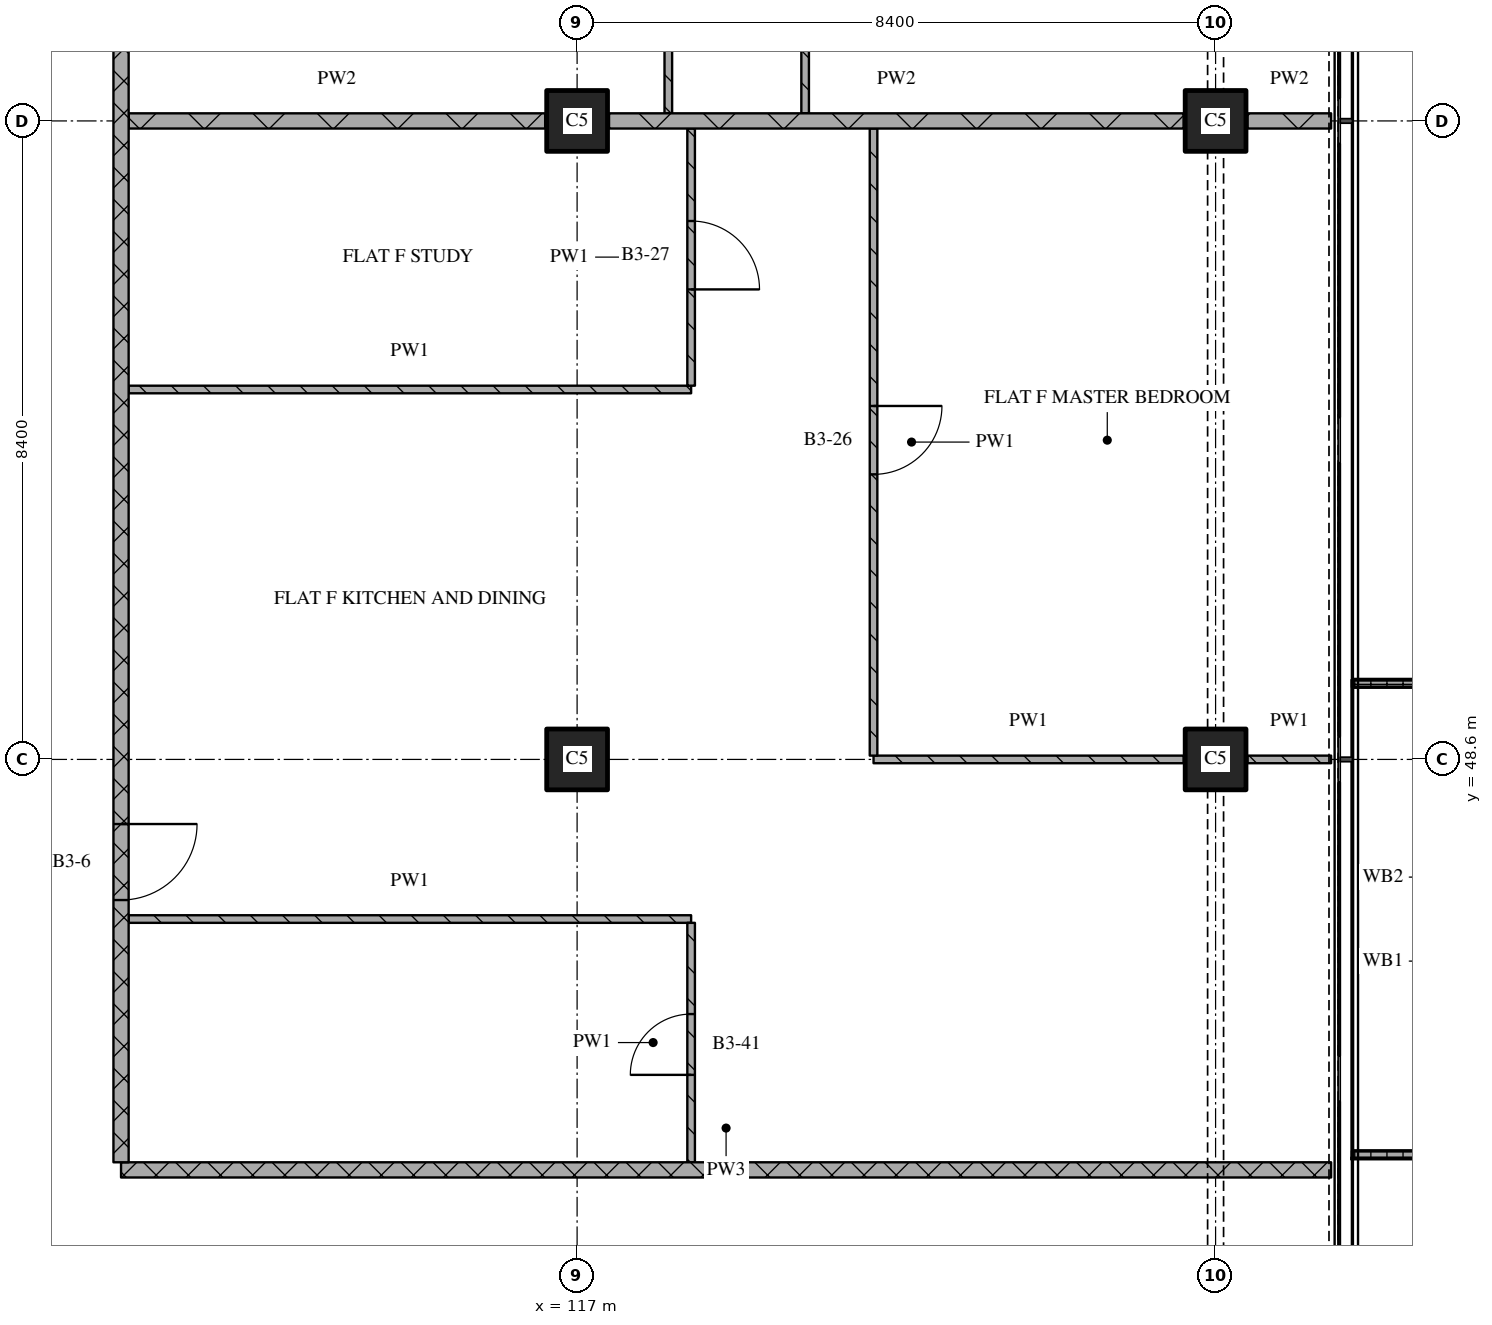
"""IFC4 building model, lengths in metres.
Left out: names, types, materials, properties, quantities, classifications, styles, units other than length and angle.
Written with IfcOpenShell. Run it as: python <this file> out.ifc"""

import sys

from ifc_helpers import new_model, si_unit, direction, frame, frame_2d, origin, origin_2d, place, context, subcontext, project, spatial, polyline, rectangle, outline, extrude, element, fill, save


model = new_model("IFC4")
c1 = context("Model", 3, precision=1e-05, world=origin(), true_north=direction((0.0, 1.0)))
c2 = subcontext(c1, "Body", "Model", "MODEL_VIEW")
j1 = project(units=[si_unit("LENGTHUNIT", "METRE"), si_unit("PLANEANGLEUNIT", "RADIAN")], contexts=[c1])
p1 = place(None, origin())
s1 = spatial("IfcSite", under=j1, at=p1, CompositionType="ELEMENT")
p2 = place(p1, origin())
s2 = spatial("IfcBuilding", under=s1, at=p2, CompositionType="ELEMENT")
p3 = place(p2, frame((0.0, 0.0, 124.05)))
s3 = spatial("IfcBuildingStorey", under=s2, at=p3, CompositionType="ELEMENT", Elevation=124.05)
for number, where, z_axis, x_axis in (
    (1, (117.0, 48.6, 0.0), (0.0, 0.0, 1.0), (1.0, 0.0, 0.0)),
    (2, (117.0, 57.0, 0.0), (0.0, 0.0, 1.0), (1.0, 0.0, 0.0)),
    (3, (125.4, 48.6, 0.0), (0.0, 0.0, 1.0), (1.0, 0.0, 0.0)),
    (4, (125.4, 57.0, 0.0), (0.0, 0.0, 1.0), (1.0, 0.0, 0.0)),
):
    element("IfcColumn", number, at=place(p3, frame(where, z_axis=z_axis, x_axis=x_axis)), inside=s3, PredefinedType="COLUMN", context=c2, shape_type="SweptSolid", body=[
        extrude(rectangle(XDim=0.8, YDim=0.8, at=origin_2d()), origin(), (0.0, 0.0, 1.0), 3.6),
    ])
p4 = place(p3, origin())
e5 = element("IfcWall", 5, at=p4, inside=s3, PredefinedType="SOLIDWALL", context=c2, shape_type="SweptSolid", body=[
    extrude(outline(polyline([(127.2, 43.35), (127.2, 43.45), (128.967, 43.45), (128.967, 49.55), (127.2, 49.55), (127.2, 49.65), (129.067, 49.65), (129.067, 43.35), (127.2, 43.35)])), origin(), (0.0, 0.0, 1.0), 1.0),
])
p5 = place(p3, frame((111.0, 43.2, 0.0), z_axis=(0.0, 0.0, 1.0), x_axis=(1.0, 0.0, 0.0)))
e6 = element("IfcWall", 6, at=p5, inside=s3, PredefinedType="PARTITIONING", context=c2, shape_type="SweptSolid", body=[
    extrude(rectangle(XDim=15.92, YDim=0.2, at=frame_2d((7.96, 0.0))), origin(), (0.0, 0.0, 1.0), 3.32),
])
p6 = place(p3, frame((111.1, 46.5, 0.0), z_axis=(0.0, 0.0, 1.0), x_axis=(1.0, 0.0, 0.0)))
e7 = element("IfcWall", 7, at=p6, inside=s3, PredefinedType="PARTITIONING", context=c2, shape_type="SweptSolid", body=[
    extrude(rectangle(XDim=7.4, YDim=0.1, at=frame_2d((3.7, 0.0))), origin(), (0.0, 0.0, 1.0), 3.32),
])
p7 = place(p3, frame((120.9, 48.6, 0.0), z_axis=(0.0, 0.0, 1.0), x_axis=(1.0, 0.0, 0.0)))
e8 = element("IfcWall", 8, at=p7, inside=s3, PredefinedType="PARTITIONING", context=c2, shape_type="SweptSolid", body=[
    extrude(rectangle(XDim=4.08, YDim=0.1, at=frame_2d((2.04, 0.0))), origin(), (0.0, 0.0, 1.0), 3.32),
])
p8 = place(p3, frame((125.82, 48.6, 0.0), z_axis=(0.0, 0.0, 1.0), x_axis=(1.0, 0.0, 0.0)))
e9 = element("IfcWall", 9, at=p8, inside=s3, PredefinedType="PARTITIONING", context=c2, shape_type="SweptSolid", body=[
    extrude(rectangle(XDim=1.1, YDim=0.1, at=frame_2d((0.55, 0.0))), origin(), (0.0, 0.0, 1.0), 3.32),
])
p9 = place(p3, frame((111.1, 53.467, 0.0), z_axis=(0.0, 0.0, 1.0), x_axis=(1.0, 0.0, 0.0)))
e10 = element("IfcWall", 10, at=p9, inside=s3, PredefinedType="PARTITIONING", context=c2, shape_type="SweptSolid", body=[
    extrude(rectangle(XDim=7.4, YDim=0.1, at=frame_2d((3.7, 0.0))), origin(), (0.0, 0.0, 1.0), 3.32),
])
p10 = place(p3, frame((111.1, 57.0, 0.0), z_axis=(0.0, 0.0, 1.0), x_axis=(1.0, 0.0, 0.0)))
e11 = element("IfcWall", 11, at=p10, inside=s3, PredefinedType="PARTITIONING", context=c2, shape_type="SweptSolid", body=[
    extrude(rectangle(XDim=5.48, YDim=0.2, at=frame_2d((2.74, 0.0))), origin(), (0.0, 0.0, 1.0), 3.32),
])
p11 = place(p3, frame((117.42, 57.0, 0.0), z_axis=(0.0, 0.0, 1.0), x_axis=(1.0, 0.0, 0.0)))
e12 = element("IfcWall", 12, at=p11, inside=s3, PredefinedType="PARTITIONING", context=c2, shape_type="SweptSolid", body=[
    extrude(rectangle(XDim=7.56, YDim=0.2, at=frame_2d((3.78, 0.0))), origin(), (0.0, 0.0, 1.0), 3.32),
])
p12 = place(p3, frame((125.82, 57.0, 0.0), z_axis=(0.0, 0.0, 1.0), x_axis=(1.0, 0.0, 0.0)))
e13 = element("IfcWall", 13, at=p12, inside=s3, PredefinedType="PARTITIONING", context=c2, shape_type="SweptSolid", body=[
    extrude(rectangle(XDim=1.1, YDim=0.2, at=frame_2d((0.55, 0.0))), origin(), (0.0, 0.0, 1.0), 3.32),
])
p13 = place(p3, frame((111.0, 75.32, 0.0), z_axis=(0.0, 0.0, 1.0), x_axis=(0.0, -1.0, 0.0)))
e14 = element("IfcWall", 14, at=p13, inside=s3, PredefinedType="PARTITIONING", context=c2, shape_type="SweptSolid", body=[
    extrude(rectangle(XDim=32.02, YDim=0.2, at=frame_2d((16.01, 0.0))), origin(), (0.0, 0.0, 1.0), 3.32),
])
p14 = place(p13, frame((11.37, 0.0, 0.0)))
e15 = element("IfcOpeningElement", 15, at=p14, cuts=e14, PredefinedType="OPENING", context=c2, shape_type="SweptSolid", body=[
    extrude(rectangle(XDim=1.0, YDim=2.1, at=frame_2d((0.5, 1.05))), frame((0.0, 0.11, 0.0), z_axis=(0.0, -1.0, 0.0), x_axis=(1.0, 0.0, 0.0)), (0.0, 0.0, 1.0), 0.22),
])
p15 = place(p13, frame((27.57, 0.0, 0.0)))
e16 = element("IfcOpeningElement", 16, at=p15, cuts=e14, PredefinedType="OPENING", context=c2, shape_type="SweptSolid", body=[
    extrude(rectangle(XDim=1.0, YDim=2.1, at=frame_2d((0.5, 1.05))), frame((0.0, 0.11, 0.0), z_axis=(0.0, -1.0, 0.0), x_axis=(1.0, 0.0, 0.0)), (0.0, 0.0, 1.0), 0.22),
])
p16 = place(p3, frame((118.2, 57.1, 0.0), z_axis=(0.0, 0.0, 1.0), x_axis=(0.0, 1.0, 0.0)))
e17 = element("IfcWall", 17, at=p16, inside=s3, PredefinedType="PARTITIONING", context=c2, shape_type="SweptSolid", body=[
    extrude(rectangle(XDim=5.55, YDim=0.1, at=frame_2d((2.775, 0.0))), origin(), (0.0, 0.0, 1.0), 3.32),
])
p17 = place(p16, frame((1.3, 0.0, 0.0)))
e18 = element("IfcOpeningElement", 18, at=p17, cuts=e17, PredefinedType="OPENING", context=c2, shape_type="SweptSolid", body=[
    extrude(rectangle(XDim=0.8, YDim=2.1, at=frame_2d((0.4, 1.05))), frame((0.0, 0.06, 0.0), z_axis=(0.0, -1.0, 0.0), x_axis=(1.0, 0.0, 0.0)), (0.0, 0.0, 1.0), 0.12),
])
p18 = place(p16, frame((4.15, 0.0, 0.0)))
e19 = element("IfcOpeningElement", 19, at=p18, cuts=e17, PredefinedType="OPENING", context=c2, shape_type="SweptSolid", body=[
    extrude(rectangle(XDim=0.8, YDim=2.1, at=frame_2d((0.4, 1.05))), frame((0.0, 0.06, 0.0), z_axis=(0.0, -1.0, 0.0), x_axis=(1.0, 0.0, 0.0)), (0.0, 0.0, 1.0), 0.12),
])
p19 = place(p3, frame((118.5, 43.3, 0.0), z_axis=(0.0, 0.0, 1.0), x_axis=(0.0, 1.0, 0.0)))
e20 = element("IfcWall", 20, at=p19, inside=s3, PredefinedType="PARTITIONING", context=c2, shape_type="SweptSolid", body=[
    extrude(rectangle(XDim=3.15, YDim=0.1, at=frame_2d((1.575, 0.0))), origin(), (0.0, 0.0, 1.0), 3.32),
])
p20 = place(p19, frame((1.15, 0.0, 0.0)))
e21 = element("IfcOpeningElement", 21, at=p20, cuts=e20, PredefinedType="OPENING", context=c2, shape_type="SweptSolid", body=[
    extrude(rectangle(XDim=0.8, YDim=2.1, at=frame_2d((0.4, 1.05))), frame((0.0, 0.06, 0.0), z_axis=(0.0, -1.0, 0.0), x_axis=(1.0, 0.0, 0.0)), (0.0, 0.0, 1.0), 0.12),
])
p21 = place(p3, frame((118.5, 53.517, 0.0), z_axis=(0.0, 0.0, 1.0), x_axis=(0.0, 1.0, 0.0)))
e22 = element("IfcWall", 22, at=p21, inside=s3, PredefinedType="PARTITIONING", context=c2, shape_type="SweptSolid", body=[
    extrude(rectangle(XDim=3.383, YDim=0.1, at=frame_2d((1.692, 0.0))), origin(), (0.0, 0.0, 1.0), 3.32),
])
p22 = place(p21, frame((1.267, 0.0, 0.0)))
e23 = element("IfcOpeningElement", 23, at=p22, cuts=e22, PredefinedType="OPENING", context=c2, shape_type="SweptSolid", body=[
    extrude(rectangle(XDim=0.9, YDim=2.1, at=frame_2d((0.45, 1.05))), frame((0.0, 0.06, 0.0), z_axis=(0.0, -1.0, 0.0), x_axis=(1.0, 0.0, 0.0)), (0.0, 0.0, 1.0), 0.12),
])
p23 = place(p3, frame((120.0, 65.35, 0.0), z_axis=(0.0, 0.0, 1.0), x_axis=(0.0, -1.0, 0.0)))
e24 = element("IfcWall", 24, at=p23, inside=s3, PredefinedType="PARTITIONING", context=c2, shape_type="SweptSolid", body=[
    extrude(rectangle(XDim=8.25, YDim=0.1, at=frame_2d((4.125, 0.0))), origin(), (0.0, 0.0, 1.0), 3.32),
])
p24 = place(p3, frame((120.9, 56.9, 0.0), z_axis=(0.0, 0.0, 1.0), x_axis=(0.0, -1.0, 0.0)))
e25 = element("IfcWall", 25, at=p24, inside=s3, PredefinedType="PARTITIONING", context=c2, shape_type="SweptSolid", body=[
    extrude(rectangle(XDim=8.25, YDim=0.1, at=frame_2d((4.125, 0.0))), origin(), (0.0, 0.0, 1.0), 3.32),
])
p25 = place(p24, frame((3.65, 0.0, 0.0)))
e26 = element("IfcOpeningElement", 26, at=p25, cuts=e25, PredefinedType="OPENING", context=c2, shape_type="SweptSolid", body=[
    extrude(rectangle(XDim=0.9, YDim=2.1, at=frame_2d((0.45, 1.05))), frame((0.0, 0.06, 0.0), z_axis=(0.0, -1.0, 0.0), x_axis=(1.0, 0.0, 0.0)), (0.0, 0.0, 1.0), 0.12),
])
p26 = place(p15, origin())
e27 = element("IfcDoor", 27, at=p26, inside=s3, OperationType="SINGLE_SWING_LEFT", PredefinedType="DOOR", context=c2, shape_type="SweptSolid", body=[
    extrude(rectangle(XDim=1.0, YDim=2.1, at=frame_2d((0.5, 1.05))), frame((0.0, 0.025, 0.0), z_axis=(0.0, -1.0, 0.0), x_axis=(1.0, 0.0, 0.0)), (0.0, 0.0, 1.0), 0.05),
])
fill(e16, e27)
p27 = place(p20, origin())
e28 = element("IfcDoor", 28, at=p27, inside=s3, OperationType="SINGLE_SWING_LEFT", PredefinedType="DOOR", context=c2, shape_type="SweptSolid", body=[
    extrude(rectangle(XDim=0.8, YDim=2.1, at=frame_2d((0.4, 1.05))), frame((0.0, 0.025, 0.0), z_axis=(0.0, -1.0, 0.0), x_axis=(1.0, 0.0, 0.0)), (0.0, 0.0, 1.0), 0.05),
])
fill(e21, e28)
p28 = place(p22, origin())
e29 = element("IfcDoor", 29, at=p28, inside=s3, OperationType="SINGLE_SWING_RIGHT", PredefinedType="DOOR", context=c2, shape_type="SweptSolid", body=[
    extrude(rectangle(XDim=0.9, YDim=2.1, at=frame_2d((0.45, 1.05))), frame((0.0, 0.025, 0.0), z_axis=(0.0, -1.0, 0.0), x_axis=(1.0, 0.0, 0.0)), (0.0, 0.0, 1.0), 0.05),
])
fill(e23, e29)
p29 = place(p25, origin())
e30 = element("IfcDoor", 30, at=p29, inside=s3, OperationType="SINGLE_SWING_LEFT", PredefinedType="DOOR", context=c2, shape_type="SweptSolid", body=[
    extrude(rectangle(XDim=0.9, YDim=2.1, at=frame_2d((0.45, 1.05))), frame((0.0, 0.025, 0.0), z_axis=(0.0, -1.0, 0.0), x_axis=(1.0, 0.0, 0.0)), (0.0, 0.0, 1.0), 0.05),
])
fill(e26, e30)
save(model, sys.argv[1])
